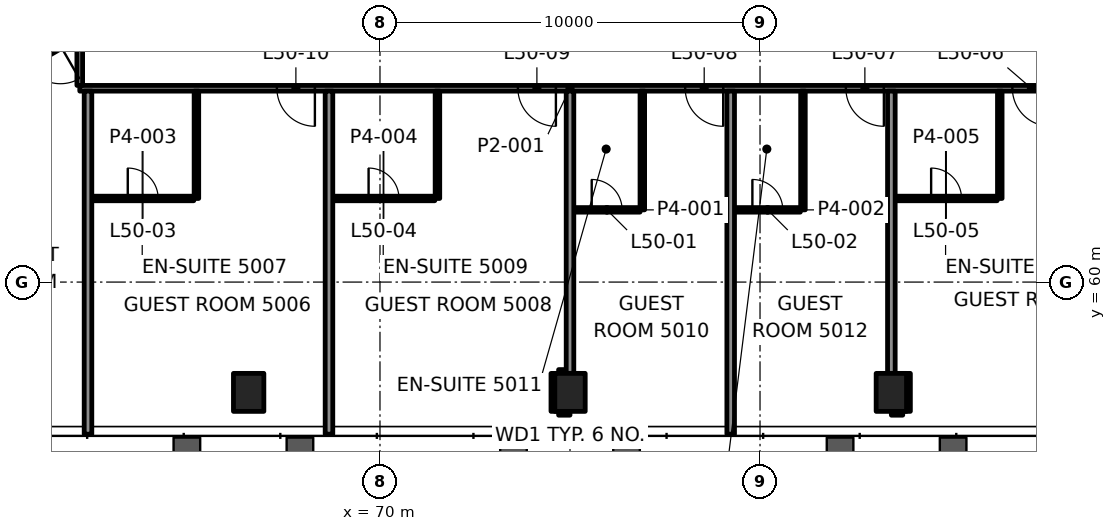
"""IFC4 building model, lengths in metres.
Left out: names, types, materials, properties, quantities, classifications, styles, units other than length and angle.
Written with IfcOpenShell. Run it as: python <this file> out.ifc"""

import sys

from ifc_helpers import new_model, si_unit, direction, frame, frame_2d, origin, origin_2d, place, context, subcontext, project, spatial, rectangle, hollow_rectangle, extrude, element, fill, save


model = new_model("IFC4")
c1 = context("Model", 3, precision=1e-05, world=origin(), true_north=direction((0.0, 1.0)))
c2 = subcontext(c1, "Body", "Model", "MODEL_VIEW")
j1 = project(units=[si_unit("LENGTHUNIT", "METRE"), si_unit("PLANEANGLEUNIT", "RADIAN")], contexts=[c1])
p1 = place(None, origin())
s1 = spatial("IfcSite", under=j1, at=p1, CompositionType="ELEMENT")
p2 = place(p1, origin())
s2 = spatial("IfcBuilding", under=s1, at=p2, CompositionType="ELEMENT")
p3 = place(p2, frame((0.0, 0.0, 214.3)))
s3 = spatial("IfcBuildingStorey", under=s2, at=p3, CompositionType="ELEMENT", Elevation=214.3)
for number, where, z_axis, x_axis in (
    (1, (66.544, 57.097, -0.0), (0.0, 0.0, 1.0), (1.0, 0.0, 0.0)),
    (2, (75.0, 57.097, -0.0), (0.0, 0.0, 1.0), (1.0, 0.0, 0.0)),
    (3, (83.456, 57.097, -0.0), (0.0, 0.0, 1.0), (1.0, 0.0, 0.0)),
):
    element("IfcColumn", number, at=place(p3, frame(where, z_axis=z_axis, x_axis=x_axis)), inside=s3, PredefinedType="COLUMN", context=c2, shape_type="SweptSolid", body=[
        extrude(hollow_rectangle(XDim=0.8, YDim=1.0, WallThickness=0.05, at=origin_2d()), origin(), (0.0, 0.0, 1.0), 3.9),
    ])
p4 = place(p3, frame((74.7, 56.597, 0.0), z_axis=(0.0, 0.0, 1.0), x_axis=(1.0, 0.0, 0.0)))
e4 = element("IfcWall", 4, at=p4, inside=s3, PredefinedType="PARTITIONING", context=c2, shape_type="SweptSolid", body=[
    extrude(rectangle(XDim=0.299, YDim=0.2, at=frame_2d((0.149, 0.0))), origin(), (0.0, 0.0, 1.0), 3.1),
])
p5 = place(p3, frame((83.456, 56.597, 0.0), z_axis=(0.0, 0.0, 1.0), x_axis=(1.0, 0.0, 0.0)))
e5 = element("IfcWall", 5, at=p5, inside=s3, PredefinedType="PARTITIONING", context=c2, shape_type="SweptSolid", body=[
    extrude(rectangle(XDim=0.3, YDim=0.2, at=frame_2d((0.15, 0.0))), origin(), (0.0, 0.0, 1.0), 3.1),
])
p6 = place(p3, frame((74.7, 57.597, 0.0), z_axis=(0.0, 0.0, 1.0), x_axis=(1.0, 0.0, 0.0)))
e6 = element("IfcWall", 6, at=p6, inside=s3, PredefinedType="PARTITIONING", context=c2, shape_type="SweptSolid", body=[
    extrude(rectangle(XDim=0.199, YDim=0.2, at=frame_2d((0.1, 0.0))), origin(), (0.0, 0.0, 1.0), 3.1),
])
p7 = place(p3, frame((75.1, 61.9, 0.0), z_axis=(0.0, 0.0, 1.0), x_axis=(1.0, 0.0, 0.0)))
e7 = element("IfcWall", 7, at=p7, inside=s3, PredefinedType="PARTITIONING", context=c2, shape_type="SweptSolid", body=[
    extrude(rectangle(XDim=1.742, YDim=0.12, at=frame_2d((0.871, 0.0))), origin(), (0.0, 0.0, 1.0), 3.1),
])
p8 = place(p7, frame((0.471, 0.0, 0.0)))
e8 = element("IfcOpeningElement", 8, at=p8, cuts=e7, PredefinedType="OPENING", context=c2, shape_type="SweptSolid", body=[
    extrude(rectangle(XDim=0.8, YDim=2.1, at=frame_2d((0.4, 1.05))), frame((0.0, 0.07, 0.0), z_axis=(0.0, -1.0, 0.0), x_axis=(1.0, 0.0, 0.0)), (0.0, 0.0, 1.0), 0.14),
])
p9 = place(p3, frame((79.338, 61.9, 0.0), z_axis=(0.0, 0.0, 1.0), x_axis=(1.0, 0.0, 0.0)))
e9 = element("IfcWall", 9, at=p9, inside=s3, PredefinedType="PARTITIONING", context=c2, shape_type="SweptSolid", body=[
    extrude(rectangle(XDim=1.722, YDim=0.12, at=frame_2d((0.861, 0.0))), origin(), (0.0, 0.0, 1.0), 3.1),
])
p10 = place(p9, frame((0.461, 0.0, 0.0)))
e10 = element("IfcOpeningElement", 10, at=p10, cuts=e9, PredefinedType="OPENING", context=c2, shape_type="SweptSolid", body=[
    extrude(rectangle(XDim=0.8, YDim=2.1, at=frame_2d((0.4, 1.05))), frame((0.0, 0.07, 0.0), z_axis=(0.0, -1.0, 0.0), x_axis=(1.0, 0.0, 0.0)), (0.0, 0.0, 1.0), 0.14),
])
p11 = place(p3, frame((62.427, 62.2, 0.0), z_axis=(0.0, 0.0, 1.0), x_axis=(1.0, 0.0, 0.0)))
e11 = element("IfcWall", 11, at=p11, inside=s3, PredefinedType="PARTITIONING", context=c2, shape_type="SweptSolid", body=[
    extrude(rectangle(XDim=2.674, YDim=0.12, at=frame_2d((1.337, 0.0))), origin(), (0.0, 0.0, 1.0), 3.1),
])
p12 = place(p11, frame((0.937, 0.0, 0.0)))
e12 = element("IfcOpeningElement", 12, at=p12, cuts=e11, PredefinedType="OPENING", context=c2, shape_type="SweptSolid", body=[
    extrude(rectangle(XDim=0.8, YDim=2.1, at=frame_2d((0.4, 1.05))), frame((0.0, 0.07, 0.0), z_axis=(0.0, -1.0, 0.0), x_axis=(1.0, 0.0, 0.0)), (0.0, 0.0, 1.0), 0.14),
])
p13 = place(p3, frame((68.758, 62.2, 0.0), z_axis=(0.0, 0.0, 1.0), x_axis=(1.0, 0.0, 0.0)))
e13 = element("IfcWall", 13, at=p13, inside=s3, PredefinedType="PARTITIONING", context=c2, shape_type="SweptSolid", body=[
    extrude(rectangle(XDim=2.684, YDim=0.12, at=frame_2d((1.342, 0.0))), origin(), (0.0, 0.0, 1.0), 3.1),
])
p14 = place(p13, frame((0.942, 0.0, 0.0)))
e14 = element("IfcOpeningElement", 14, at=p14, cuts=e13, PredefinedType="OPENING", context=c2, shape_type="SweptSolid", body=[
    extrude(rectangle(XDim=0.8, YDim=2.1, at=frame_2d((0.4, 1.05))), frame((0.0, 0.07, 0.0), z_axis=(0.0, -1.0, 0.0), x_axis=(1.0, 0.0, 0.0)), (0.0, 0.0, 1.0), 0.14),
])
p15 = place(p3, frame((83.566, 62.2, 0.0), z_axis=(0.0, 0.0, 1.0), x_axis=(1.0, 0.0, 0.0)))
e15 = element("IfcWall", 15, at=p15, inside=s3, PredefinedType="PARTITIONING", context=c2, shape_type="SweptSolid", body=[
    extrude(rectangle(XDim=2.674, YDim=0.12, at=frame_2d((1.337, 0.0))), origin(), (0.0, 0.0, 1.0), 3.1),
])
p16 = place(p15, frame((0.937, 0.0, 0.0)))
e16 = element("IfcOpeningElement", 16, at=p16, cuts=e15, PredefinedType="OPENING", context=c2, shape_type="SweptSolid", body=[
    extrude(rectangle(XDim=0.8, YDim=2.1, at=frame_2d((0.4, 1.05))), frame((0.0, 0.07, 0.0), z_axis=(0.0, -1.0, 0.0), x_axis=(1.0, 0.0, 0.0)), (0.0, 0.0, 1.0), 0.14),
])
p17 = place(p3, frame((87.899, 65.1, 0.0), z_axis=(0.0, 0.0, 1.0), x_axis=(-1.0, 0.0, 0.0)))
e17 = element("IfcWall", 17, at=p17, inside=s3, PredefinedType="PARTITIONING", context=c2, shape_type="SweptSolid", body=[
    extrude(rectangle(XDim=25.799, YDim=0.15, at=frame_2d((12.899, 0.0))), origin(), (0.0, 0.0, 1.0), 3.1),
])
p18 = place(p17, frame((0.259, 0.0, 0.0)))
e18 = element("IfcOpeningElement", 18, at=p18, cuts=e17, PredefinedType="OPENING", context=c2, shape_type="SweptSolid", body=[
    extrude(rectangle(XDim=1.0, YDim=2.1, at=frame_2d((0.5, 1.05))), frame((0.0, 0.085, 0.0), z_axis=(0.0, -1.0, 0.0), x_axis=(1.0, 0.0, 0.0)), (0.0, 0.0, 1.0), 0.17),
])
p19 = place(p17, frame((4.641, 0.0, 0.0)))
e19 = element("IfcOpeningElement", 19, at=p19, cuts=e17, PredefinedType="OPENING", context=c2, shape_type="SweptSolid", body=[
    extrude(rectangle(XDim=1.0, YDim=2.1, at=frame_2d((0.5, 1.05))), frame((0.0, 0.085, 0.0), z_axis=(0.0, -1.0, 0.0), x_axis=(1.0, 0.0, 0.0)), (0.0, 0.0, 1.0), 0.17),
])
p20 = place(p17, frame((8.868, 0.0, 0.0)))
e20 = element("IfcOpeningElement", 20, at=p20, cuts=e17, PredefinedType="OPENING", context=c2, shape_type="SweptSolid", body=[
    extrude(rectangle(XDim=1.0, YDim=2.1, at=frame_2d((0.5, 1.05))), frame((0.0, 0.085, 0.0), z_axis=(0.0, -1.0, 0.0), x_axis=(1.0, 0.0, 0.0)), (0.0, 0.0, 1.0), 0.17),
])
p21 = place(p17, frame((13.271, 0.0, 0.0)))
e21 = element("IfcOpeningElement", 21, at=p21, cuts=e17, PredefinedType="OPENING", context=c2, shape_type="SweptSolid", body=[
    extrude(rectangle(XDim=1.0, YDim=2.1, at=frame_2d((0.5, 1.05))), frame((0.0, 0.085, 0.0), z_axis=(0.0, -1.0, 0.0), x_axis=(1.0, 0.0, 0.0)), (0.0, 0.0, 1.0), 0.17),
])
p22 = place(p17, frame((19.612, 0.0, 0.0)))
e22 = element("IfcOpeningElement", 22, at=p22, cuts=e17, PredefinedType="OPENING", context=c2, shape_type="SweptSolid", body=[
    extrude(rectangle(XDim=1.0, YDim=2.1, at=frame_2d((0.5, 1.05))), frame((0.0, 0.085, 0.0), z_axis=(0.0, -1.0, 0.0), x_axis=(1.0, 0.0, 0.0)), (0.0, 0.0, 1.0), 0.17),
])
p23 = place(p3, frame((62.1, 66.513, 0.0), z_axis=(0.0, 0.0, 1.0), x_axis=(-0.866025886419, -0.499999164051, 0.0)))
e23 = element("IfcWall", 23, at=p23, inside=s3, PredefinedType="PARTITIONING", context=c2, shape_type="SweptSolid", body=[
    extrude(rectangle(XDim=12.754, YDim=0.15, at=frame_2d((6.377, 0.0))), origin(), (0.0, 0.0, 1.0), 2.947),
])
p24 = place(p23, frame((0.587, 0.0, 0.0)))
e24 = element("IfcOpeningElement", 24, at=p24, cuts=e23, PredefinedType="OPENING", context=c2, shape_type="SweptSolid", body=[
    extrude(rectangle(XDim=1.0, YDim=2.1, at=frame_2d((0.5, 1.05))), frame((0.0, 0.085, 0.0), z_axis=(0.0, -1.0, 0.0), x_axis=(1.0, 0.0, 0.0)), (0.0, 0.0, 1.0), 0.17),
])
p25 = place(p23, frame((7.742, 0.0, 0.0)))
e25 = element("IfcOpeningElement", 25, at=p25, cuts=e23, PredefinedType="OPENING", context=c2, shape_type="SweptSolid", body=[
    extrude(rectangle(XDim=1.0, YDim=2.1, at=frame_2d((0.5, 1.05))), frame((0.0, 0.085, 0.0), z_axis=(0.0, -1.0, 0.0), x_axis=(1.0, 0.0, 0.0)), (0.0, 0.0, 1.0), 0.17),
])
p26 = place(p3, frame((50.155, 61.695, 0.0), z_axis=(0.0, 0.0, 1.0), x_axis=(0.8660236305, 0.500003071406, 0.0)))
e26 = element("IfcWall", 26, at=p26, inside=s3, PredefinedType="PARTITIONING", context=c2, shape_type="SweptSolid", body=[
    extrude(rectangle(XDim=13.707, YDim=0.15, at=frame_2d((6.853, 0.0))), origin(), (0.0, 0.0, 1.0), 3.1),
])
p27 = place(p26, frame((1.736, 0.0, 0.0)))
e27 = element("IfcOpeningElement", 27, at=p27, cuts=e26, PredefinedType="OPENING", context=c2, shape_type="SweptSolid", body=[
    extrude(rectangle(XDim=1.0, YDim=2.1, at=frame_2d((0.5, 1.05))), frame((0.0, 0.085, 0.0), z_axis=(0.0, -1.0, 0.0), x_axis=(1.0, 0.0, 0.0)), (0.0, 0.0, 1.0), 0.17),
])
p28 = place(p26, frame((11.777, 0.0, 0.0)))
e28 = element("IfcOpeningElement", 28, at=p28, cuts=e26, PredefinedType="OPENING", context=c2, shape_type="SweptSolid", body=[
    extrude(rectangle(XDim=1.0, YDim=2.1, at=frame_2d((0.5, 1.05))), frame((0.0, 0.085, 0.0), z_axis=(0.0, -1.0, 0.0), x_axis=(1.0, 0.0, 0.0)), (0.0, 0.0, 1.0), 0.17),
])
p29 = place(p3, frame((86.309, 62.2, 0.0), z_axis=(0.0, 0.0, 1.0), x_axis=(0.0, 1.0, 0.0)))
e29 = element("IfcWall", 29, at=p29, inside=s3, PredefinedType="PARTITIONING", context=c2, shape_type="SweptSolid", body=[
    extrude(rectangle(XDim=2.825, YDim=0.12, at=frame_2d((1.413, 0.0))), origin(), (0.0, 0.0, 1.0), 3.1),
])
p30 = place(p3, frame((83.856, 56.598, 0.0), z_axis=(0.0, 0.0, 1.0), x_axis=(0.0, 1.0, 0.0)))
e30 = element("IfcWall", 30, at=p30, inside=s3, PredefinedType="PARTITIONING", context=c2, shape_type="SweptSolid", body=[
    extrude(rectangle(XDim=0.999, YDim=0.2, at=frame_2d((0.5, 0.0))), origin(), (0.0, 0.0, 1.0), 3.022),
])
p31 = place(p3, frame((83.456, 57.597, 0.0), z_axis=(0.0, 0.0, 1.0), x_axis=(0.0, 1.0, 0.0)))
e31 = element("IfcWall", 31, at=p31, inside=s3, PredefinedType="PARTITIONING", context=c2, shape_type="SweptSolid", body=[
    extrude(rectangle(XDim=7.427, YDim=0.2, at=frame_2d((3.714, 0.0))), origin(), (0.0, 0.0, 1.0), 3.1),
])
p32 = place(p3, frame((81.13, 61.9, 0.0), z_axis=(0.0, 0.0, 1.0), x_axis=(0.0, 1.0, 0.0)))
e32 = element("IfcWall", 32, at=p32, inside=s3, PredefinedType="PARTITIONING", context=c2, shape_type="SweptSolid", body=[
    extrude(rectangle(XDim=3.125, YDim=0.12, at=frame_2d((1.562, 0.0))), origin(), (0.0, 0.0, 1.0), 3.1),
])
p33 = place(p3, frame((79.228, 55.998, 0.0), z_axis=(0.0, 0.0, 1.0), x_axis=(0.0, 1.0, 0.0)))
e33 = element("IfcWall", 33, at=p33, inside=s3, PredefinedType="PARTITIONING", context=c2, shape_type="SweptSolid", body=[
    extrude(rectangle(XDim=9.027, YDim=0.2, at=frame_2d((4.514, 0.0))), origin(), (0.0, 0.0, 1.0), 3.022),
])
p34 = place(p3, frame((76.903, 61.9, 0.0), z_axis=(0.0, 0.0, 1.0), x_axis=(0.0, 1.0, 0.0)))
e34 = element("IfcWall", 34, at=p34, inside=s3, PredefinedType="PARTITIONING", context=c2, shape_type="SweptSolid", body=[
    extrude(rectangle(XDim=3.125, YDim=0.12, at=frame_2d((1.562, 0.0))), origin(), (0.0, 0.0, 1.0), 3.1),
])
p35 = place(p3, frame((75.0, 57.598, 0.0), z_axis=(0.0, 0.0, 1.0), x_axis=(0.0, 1.0, 0.0)))
e35 = element("IfcWall", 35, at=p35, inside=s3, PredefinedType="PARTITIONING", context=c2, shape_type="SweptSolid", body=[
    extrude(rectangle(XDim=7.427, YDim=0.2, at=frame_2d((3.713, 0.0))), origin(), (0.0, 0.0, 1.0), 3.1),
])
p36 = place(p3, frame((74.6, 56.598, 0.0), z_axis=(0.0, 0.0, 1.0), x_axis=(0.0, 1.0, 0.0)))
e36 = element("IfcWall", 36, at=p36, inside=s3, PredefinedType="PARTITIONING", context=c2, shape_type="SweptSolid", body=[
    extrude(rectangle(XDim=0.999, YDim=0.2, at=frame_2d((0.5, 0.0))), origin(), (0.0, 0.0, 1.0), 3.022),
])
p37 = place(p3, frame((71.512, 62.2, 0.0), z_axis=(0.0, 0.0, 1.0), x_axis=(0.0, 1.0, 0.0)))
e37 = element("IfcWall", 37, at=p37, inside=s3, PredefinedType="PARTITIONING", context=c2, shape_type="SweptSolid", body=[
    extrude(rectangle(XDim=2.825, YDim=0.12, at=frame_2d((1.413, 0.0))), origin(), (0.0, 0.0, 1.0), 3.1),
])
p38 = place(p3, frame((68.658, 55.998, 0.0), z_axis=(0.0, 0.0, 1.0), x_axis=(0.0, 1.0, 0.0)))
e38 = element("IfcWall", 38, at=p38, inside=s3, PredefinedType="PARTITIONING", context=c2, shape_type="SweptSolid", body=[
    extrude(rectangle(XDim=9.027, YDim=0.2, at=frame_2d((4.514, 0.0))), origin(), (0.0, 0.0, 1.0), 3.022),
])
p39 = place(p3, frame((65.17, 62.2, 0.0), z_axis=(0.0, 0.0, 1.0), x_axis=(0.0, 1.0, 0.0)))
e39 = element("IfcWall", 39, at=p39, inside=s3, PredefinedType="PARTITIONING", context=c2, shape_type="SweptSolid", body=[
    extrude(rectangle(XDim=2.825, YDim=0.12, at=frame_2d((1.413, 0.0))), origin(), (0.0, 0.0, 1.0), 3.1),
])
p40 = place(p3, frame((62.317, 55.998, 0.0), z_axis=(0.0, 0.0, 1.0), x_axis=(0.0, 1.0, 0.0)))
e40 = element("IfcWall", 40, at=p40, inside=s3, PredefinedType="PARTITIONING", context=c2, shape_type="SweptSolid", body=[
    extrude(rectangle(XDim=9.027, YDim=0.2, at=frame_2d((4.514, 0.0))), origin(), (0.0, 0.0, 1.0), 3.022),
])
p41 = place(p3, frame((62.1, 65.176, 0.0), z_axis=(0.0, 0.0, 1.0), x_axis=(0.0, 1.0, 0.0)))
e41 = element("IfcWall", 41, at=p41, inside=s3, PredefinedType="PARTITIONING", context=c2, shape_type="SweptSolid", body=[
    extrude(rectangle(XDim=1.201, YDim=0.15, at=frame_2d((0.6, 0.0))), origin(), (0.0, 0.0, 1.0), 2.947),
])
p42 = place(p8, origin())
e42 = element("IfcDoor", 42, at=p42, inside=s3, OperationType="SINGLE_SWING_RIGHT", PredefinedType="DOOR", context=c2, shape_type="SweptSolid", body=[
    extrude(rectangle(XDim=0.8, YDim=2.1, at=frame_2d((0.4, 1.05))), frame((0.0, 0.025, 0.0), z_axis=(0.0, -1.0, 0.0), x_axis=(1.0, 0.0, 0.0)), (0.0, 0.0, 1.0), 0.05),
])
fill(e8, e42)
p43 = place(p10, origin())
e43 = element("IfcDoor", 43, at=p43, inside=s3, OperationType="SINGLE_SWING_RIGHT", PredefinedType="DOOR", context=c2, shape_type="SweptSolid", body=[
    extrude(rectangle(XDim=0.8, YDim=2.1, at=frame_2d((0.4, 1.05))), frame((0.0, 0.025, 0.0), z_axis=(0.0, -1.0, 0.0), x_axis=(1.0, 0.0, 0.0)), (0.0, 0.0, 1.0), 0.05),
])
fill(e10, e43)
p44 = place(p12, origin())
e44 = element("IfcDoor", 44, at=p44, inside=s3, OperationType="SINGLE_SWING_RIGHT", PredefinedType="DOOR", context=c2, shape_type="SweptSolid", body=[
    extrude(rectangle(XDim=0.8, YDim=2.1, at=frame_2d((0.4, 1.05))), frame((0.0, 0.025, 0.0), z_axis=(0.0, -1.0, 0.0), x_axis=(1.0, 0.0, 0.0)), (0.0, 0.0, 1.0), 0.05),
])
fill(e12, e44)
p45 = place(p14, origin())
e45 = element("IfcDoor", 45, at=p45, inside=s3, OperationType="SINGLE_SWING_RIGHT", PredefinedType="DOOR", context=c2, shape_type="SweptSolid", body=[
    extrude(rectangle(XDim=0.8, YDim=2.1, at=frame_2d((0.4, 1.05))), frame((0.0, 0.025, 0.0), z_axis=(0.0, -1.0, 0.0), x_axis=(1.0, 0.0, 0.0)), (0.0, 0.0, 1.0), 0.05),
])
fill(e14, e45)
p46 = place(p16, origin())
e46 = element("IfcDoor", 46, at=p46, inside=s3, OperationType="SINGLE_SWING_RIGHT", PredefinedType="DOOR", context=c2, shape_type="SweptSolid", body=[
    extrude(rectangle(XDim=0.8, YDim=2.1, at=frame_2d((0.4, 1.05))), frame((0.0, 0.025, 0.0), z_axis=(0.0, -1.0, 0.0), x_axis=(1.0, 0.0, 0.0)), (0.0, 0.0, 1.0), 0.05),
])
fill(e16, e46)
p47 = place(p18, origin())
e47 = element("IfcDoor", 47, at=p47, inside=s3, OperationType="SINGLE_SWING_RIGHT", PredefinedType="DOOR", context=c2, shape_type="SweptSolid", body=[
    extrude(rectangle(XDim=1.0, YDim=2.1, at=frame_2d((0.5, 1.05))), frame((0.0, 0.025, 0.0), z_axis=(0.0, -1.0, 0.0), x_axis=(1.0, 0.0, 0.0)), (0.0, 0.0, 1.0), 0.05),
])
fill(e18, e47)
p48 = place(p19, origin())
e48 = element("IfcDoor", 48, at=p48, inside=s3, OperationType="SINGLE_SWING_RIGHT", PredefinedType="DOOR", context=c2, shape_type="SweptSolid", body=[
    extrude(rectangle(XDim=1.0, YDim=2.1, at=frame_2d((0.5, 1.05))), frame((0.0, 0.025, 0.0), z_axis=(0.0, -1.0, 0.0), x_axis=(1.0, 0.0, 0.0)), (0.0, 0.0, 1.0), 0.05),
])
fill(e19, e48)
p49 = place(p20, origin())
e49 = element("IfcDoor", 49, at=p49, inside=s3, OperationType="SINGLE_SWING_RIGHT", PredefinedType="DOOR", context=c2, shape_type="SweptSolid", body=[
    extrude(rectangle(XDim=1.0, YDim=2.1, at=frame_2d((0.5, 1.05))), frame((0.0, 0.025, 0.0), z_axis=(0.0, -1.0, 0.0), x_axis=(1.0, 0.0, 0.0)), (0.0, 0.0, 1.0), 0.05),
])
fill(e20, e49)
p50 = place(p21, origin())
e50 = element("IfcDoor", 50, at=p50, inside=s3, OperationType="SINGLE_SWING_RIGHT", PredefinedType="DOOR", context=c2, shape_type="SweptSolid", body=[
    extrude(rectangle(XDim=1.0, YDim=2.1, at=frame_2d((0.5, 1.05))), frame((0.0, 0.025, 0.0), z_axis=(0.0, -1.0, 0.0), x_axis=(1.0, 0.0, 0.0)), (0.0, 0.0, 1.0), 0.05),
])
fill(e21, e50)
p51 = place(p22, origin())
e51 = element("IfcDoor", 51, at=p51, inside=s3, OperationType="SINGLE_SWING_RIGHT", PredefinedType="DOOR", context=c2, shape_type="SweptSolid", body=[
    extrude(rectangle(XDim=1.0, YDim=2.1, at=frame_2d((0.5, 1.05))), frame((0.0, 0.025, 0.0), z_axis=(0.0, -1.0, 0.0), x_axis=(1.0, 0.0, 0.0)), (0.0, 0.0, 1.0), 0.05),
])
fill(e22, e51)
p52 = place(p24, origin())
e52 = element("IfcDoor", 52, at=p52, inside=s3, OperationType="SINGLE_SWING_RIGHT", PredefinedType="DOOR", context=c2, shape_type="SweptSolid", body=[
    extrude(rectangle(XDim=1.0, YDim=2.1, at=frame_2d((0.5, 1.05))), frame((0.0, 0.025, 0.0), z_axis=(0.0, -1.0, 0.0), x_axis=(1.0, 0.0, 0.0)), (0.0, 0.0, 1.0), 0.05),
])
fill(e24, e52)
p53 = place(p3, origin())
p54 = place(p53, frame((86.333, 55.952, 0.15), z_axis=(0.0, 0.0, 1.0), x_axis=(1.0, 0.0, 0.0)))
p55 = place(p54, origin())
e53 = element("IfcWindow", 53, at=p55, inside=s3, PartitioningType="SINGLE_PANEL", PredefinedType="WINDOW", context=c2, shape_type="SweptSolid", body=[
    extrude(rectangle(XDim=2.743, YDim=3.55, at=frame_2d((1.372, 1.775))), frame((0.0, 0.03, 0.0), z_axis=(0.0, -1.0, 0.0), x_axis=(1.0, 0.0, 0.0)), (0.0, 0.0, 1.0), 0.06),
])
save(model, sys.argv[1])
